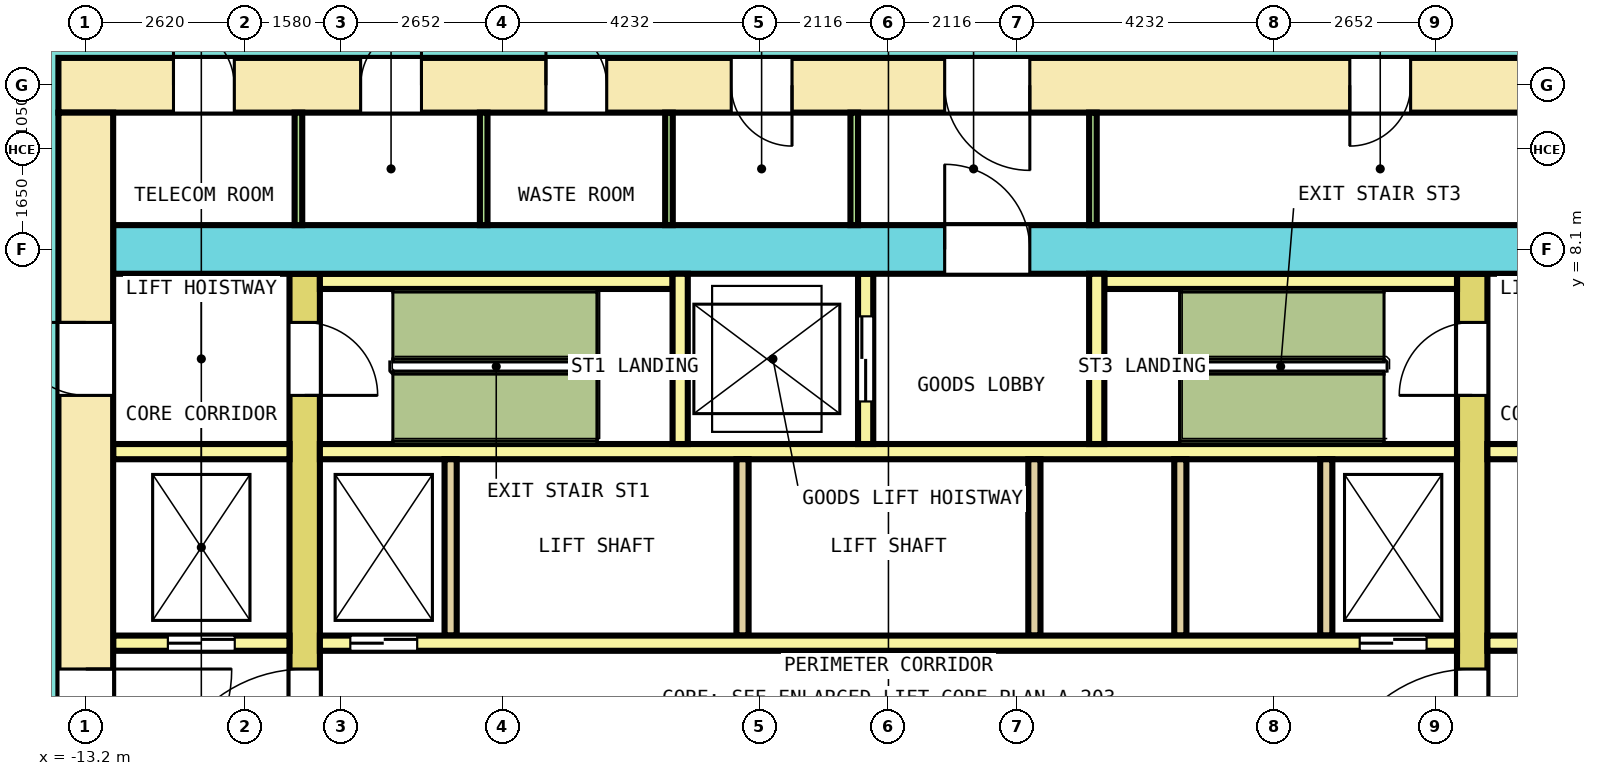
"""IFC4 building model, lengths in metres.
Left out: names, types, materials, properties, quantities, classifications, styles, units other than length and angle.
Written with IfcOpenShell. Run it as: python <this file> out.ifc"""

import sys

from ifc_helpers import new_model, si_unit, direction, frame, frame_2d, origin, place, context, subcontext, project, spatial, rectangle, extrude, element, fill, save


model = new_model("IFC4")
c1 = context("Model", 3, precision=1e-05, world=origin(), true_north=direction((0.0, 1.0)))
c2 = subcontext(c1, "Body", "Model", "MODEL_VIEW")
j1 = project(units=[si_unit("LENGTHUNIT", "METRE"), si_unit("PLANEANGLEUNIT", "RADIAN")], contexts=[c1])
p1 = place(None, origin())
s1 = spatial("IfcSite", under=j1, at=p1, CompositionType="ELEMENT")
p2 = place(p1, origin())
s2 = spatial("IfcBuilding", under=s1, at=p2, CompositionType="ELEMENT")
p3 = place(p2, frame((0.0, 0.0, 5.6)))
s3 = spatial("IfcBuildingStorey", under=s2, at=p3, CompositionType="ELEMENT", Elevation=5.6)
p4 = place(p3, frame((-13.65, 10.8, 0.0), z_axis=(0.0, 0.0, 1.0), x_axis=(1.0, 0.0, 0.0)))
e1 = element("IfcWall", 1, at=p4, inside=s3, PredefinedType="SHEAR", context=c2, shape_type="SweptSolid", body=[
    extrude(rectangle(XDim=27.3, YDim=0.9, at=frame_2d((13.65, 0.0))), origin(), (0.0, 0.0, 1.0), 4.3),
])
p5 = place(p4, frame((1.892, 0.0, 0.0)))
e2 = element("IfcOpeningElement", 2, at=p5, cuts=e1, PredefinedType="OPENING", context=c2, shape_type="SweptSolid", body=[
    extrude(rectangle(XDim=1.0, YDim=2.1, at=frame_2d((0.5, 1.05))), frame((0.0, 0.46, 0.0), z_axis=(0.0, -1.0, 0.0), x_axis=(1.0, 0.0, 0.0)), (0.0, 0.0, 1.0), 0.92),
])
p6 = place(p4, frame((4.97, 0.0, 0.0)))
e3 = element("IfcOpeningElement", 3, at=p6, cuts=e1, PredefinedType="OPENING", context=c2, shape_type="SweptSolid", body=[
    extrude(rectangle(XDim=1.0, YDim=2.1, at=frame_2d((0.5, 1.05))), frame((0.0, 0.46, 0.0), z_axis=(0.0, -1.0, 0.0), x_axis=(1.0, 0.0, 0.0)), (0.0, 0.0, 1.0), 0.92),
])
p7 = place(p4, frame((8.017, 0.0, 0.0)))
e4 = element("IfcOpeningElement", 4, at=p7, cuts=e1, PredefinedType="OPENING", context=c2, shape_type="SweptSolid", body=[
    extrude(rectangle(XDim=1.0, YDim=2.1, at=frame_2d((0.5, 1.05))), frame((0.0, 0.46, 0.0), z_axis=(0.0, -1.0, 0.0), x_axis=(1.0, 0.0, 0.0)), (0.0, 0.0, 1.0), 0.92),
])
p8 = place(p4, frame((11.064, 0.0, 0.0)))
e5 = element("IfcOpeningElement", 5, at=p8, cuts=e1, PredefinedType="OPENING", context=c2, shape_type="SweptSolid", body=[
    extrude(rectangle(XDim=1.0, YDim=2.1, at=frame_2d((0.5, 1.05))), frame((0.0, 0.46, 0.0), z_axis=(0.0, -1.0, 0.0), x_axis=(1.0, 0.0, 0.0)), (0.0, 0.0, 1.0), 0.92),
])
p9 = place(p4, frame((21.238, 0.0, 0.0)))
e6 = element("IfcOpeningElement", 6, at=p9, cuts=e1, PredefinedType="OPENING", context=c2, shape_type="SweptSolid", body=[
    extrude(rectangle(XDim=1.0, YDim=2.1, at=frame_2d((0.5, 1.05))), frame((0.0, 0.46, 0.0), z_axis=(0.0, -1.0, 0.0), x_axis=(1.0, 0.0, 0.0)), (0.0, 0.0, 1.0), 0.92),
])
p10 = place(p4, frame((14.575, 0.0, 0.0)))
e7 = element("IfcOpeningElement", 7, at=p10, cuts=e1, PredefinedType="OPENING", context=c2, shape_type="SweptSolid", body=[
    extrude(rectangle(XDim=1.4, YDim=2.1, at=frame_2d((0.7, 1.05))), frame((0.0, 0.46, 0.0), z_axis=(0.0, -1.0, 0.0), x_axis=(1.0, 0.0, 0.0)), (0.0, 0.0, 1.0), 0.92),
])
p11 = place(p3, frame((-13.2, -10.35, 0.0), z_axis=(0.0, 0.0, 1.0), x_axis=(0.0, 1.0, 0.0)))
e8 = element("IfcWall", 8, at=p11, inside=s3, PredefinedType="SHEAR", context=c2, shape_type="SweptSolid", body=[
    extrude(rectangle(XDim=20.7, YDim=0.9, at=frame_2d((10.35, 0.0))), origin(), (0.0, 0.0, 1.0), 4.3),
])
p12 = place(p11, frame((9.15, 0.0, 0.0)))
e9 = element("IfcOpeningElement", 9, at=p12, cuts=e8, PredefinedType="OPENING", context=c2, shape_type="SweptSolid", body=[
    extrude(rectangle(XDim=2.4, YDim=2.1, at=frame_2d((1.2, 1.05))), frame((0.0, 0.46, 0.0), z_axis=(0.0, -1.0, 0.0), x_axis=(1.0, 0.0, 0.0)), (0.0, 0.0, 1.0), 0.92),
])
p13 = place(p11, frame((16.05, 0.0, 0.0)))
e10 = element("IfcOpeningElement", 10, at=p13, cuts=e8, PredefinedType="OPENING", context=c2, shape_type="SweptSolid", body=[
    extrude(rectangle(XDim=1.2, YDim=2.1, at=frame_2d((0.6, 1.05))), frame((0.0, 0.46, 0.0), z_axis=(0.0, -1.0, 0.0), x_axis=(1.0, 0.0, 0.0)), (0.0, 0.0, 1.0), 0.92),
])
p14 = place(p11, frame((3.45, 0.0, 0.0)))
e11 = element("IfcOpeningElement", 11, at=p14, cuts=e8, PredefinedType="OPENING", context=c2, shape_type="SweptSolid", body=[
    extrude(rectangle(XDim=1.2, YDim=2.1, at=frame_2d((0.6, 1.05))), frame((0.0, 0.46, 0.0), z_axis=(0.0, -1.0, 0.0), x_axis=(1.0, 0.0, 0.0)), (0.0, 0.0, 1.0), 0.92),
])
p15 = place(p3, frame((-12.75, 8.1, 0.0), z_axis=(0.0, 0.0, 1.0), x_axis=(1.0, 0.0, 0.0)))
e12 = element("IfcWall", 12, at=p15, inside=s3, PredefinedType="SHEAR", context=c2, shape_type="SweptSolid", body=[
    extrude(rectangle(XDim=25.5, YDim=0.8, at=frame_2d((12.75, 0.0))), origin(), (0.0, 0.0, 1.0), 4.3),
])
p16 = place(p15, frame((13.675, 0.0, 0.0)))
e13 = element("IfcOpeningElement", 13, at=p16, cuts=e12, PredefinedType="OPENING", context=c2, shape_type="SweptSolid", body=[
    extrude(rectangle(XDim=1.4, YDim=2.1, at=frame_2d((0.7, 1.05))), frame((0.0, 0.41, 0.0), z_axis=(0.0, -1.0, 0.0), x_axis=(1.0, 0.0, 0.0)), (0.0, 0.0, 1.0), 0.82),
])
p17 = place(p3, frame((-9.6, -7.7, 0.0), z_axis=(0.0, 0.0, 1.0), x_axis=(0.0, 1.0, 0.0)))
e14 = element("IfcWall", 14, at=p17, inside=s3, PredefinedType="SHEAR", context=c2, shape_type="SweptSolid", body=[
    extrude(rectangle(XDim=15.4, YDim=0.5, at=frame_2d((7.7, 0.0))), origin(), (0.0, 0.0, 1.0), 4.3),
])
p18 = place(p17, frame((6.5, 0.0, 0.0)))
e15 = element("IfcOpeningElement", 15, at=p18, cuts=e14, PredefinedType="OPENING", context=c2, shape_type="SweptSolid", body=[
    extrude(rectangle(XDim=2.4, YDim=2.1, at=frame_2d((1.2, 1.05))), frame((0.0, 0.26, 0.0), z_axis=(0.0, -1.0, 0.0), x_axis=(1.0, 0.0, 0.0)), (0.0, 0.0, 1.0), 0.52),
])
p19 = place(p17, frame((13.4, 0.0, 0.0)))
e16 = element("IfcOpeningElement", 16, at=p19, cuts=e14, PredefinedType="OPENING", context=c2, shape_type="SweptSolid", body=[
    extrude(rectangle(XDim=1.2, YDim=2.1, at=frame_2d((0.6, 1.05))), frame((0.0, 0.26, 0.0), z_axis=(0.0, -1.0, 0.0), x_axis=(1.0, 0.0, 0.0)), (0.0, 0.0, 1.0), 0.52),
])
p20 = place(p17, frame((0.8, 0.0, 0.0)))
e17 = element("IfcOpeningElement", 17, at=p20, cuts=e14, PredefinedType="OPENING", context=c2, shape_type="SweptSolid", body=[
    extrude(rectangle(XDim=1.2, YDim=2.1, at=frame_2d((0.6, 1.05))), frame((0.0, 0.26, 0.0), z_axis=(0.0, -1.0, 0.0), x_axis=(1.0, 0.0, 0.0)), (0.0, 0.0, 1.0), 0.52),
])
p21 = place(p3, frame((9.6, -7.7, 0.0), z_axis=(0.0, 0.0, 1.0), x_axis=(0.0, 1.0, 0.0)))
e18 = element("IfcWall", 18, at=p21, inside=s3, PredefinedType="SHEAR", context=c2, shape_type="SweptSolid", body=[
    extrude(rectangle(XDim=15.4, YDim=0.5, at=frame_2d((7.7, 0.0))), origin(), (0.0, 0.0, 1.0), 4.3),
])
p22 = place(p21, frame((6.5, 0.0, 0.0)))
e19 = element("IfcOpeningElement", 19, at=p22, cuts=e18, PredefinedType="OPENING", context=c2, shape_type="SweptSolid", body=[
    extrude(rectangle(XDim=2.4, YDim=2.1, at=frame_2d((1.2, 1.05))), frame((0.0, 0.26, 0.0), z_axis=(0.0, -1.0, 0.0), x_axis=(1.0, 0.0, 0.0)), (0.0, 0.0, 1.0), 0.52),
])
p23 = place(p21, frame((13.4, 0.0, 0.0)))
e20 = element("IfcOpeningElement", 20, at=p23, cuts=e18, PredefinedType="OPENING", context=c2, shape_type="SweptSolid", body=[
    extrude(rectangle(XDim=1.2, YDim=2.1, at=frame_2d((0.6, 1.05))), frame((0.0, 0.26, 0.0), z_axis=(0.0, -1.0, 0.0), x_axis=(1.0, 0.0, 0.0)), (0.0, 0.0, 1.0), 0.52),
])
p24 = place(p21, frame((0.9, 0.0, 0.0)))
e21 = element("IfcOpeningElement", 21, at=p24, cuts=e18, PredefinedType="OPENING", context=c2, shape_type="SweptSolid", body=[
    extrude(rectangle(XDim=1.0, YDim=2.1, at=frame_2d((0.5, 1.05))), frame((0.0, 0.26, 0.0), z_axis=(0.0, -1.0, 0.0), x_axis=(1.0, 0.0, 0.0)), (0.0, 0.0, 1.0), 0.52),
])
p25 = place(p3, frame((-12.75, 1.625, 0.0), z_axis=(0.0, 0.0, 1.0), x_axis=(1.0, 0.0, 0.0)))
e22 = element("IfcWall", 22, at=p25, inside=s3, PredefinedType="SOLIDWALL", context=c2, shape_type="SweptSolid", body=[
    extrude(rectangle(XDim=2.9, YDim=0.25, at=frame_2d((1.45, 0.0))), origin(), (0.0, 0.0, 1.0), 4.3),
])
p26 = place(p25, frame((0.9, 0.0, 0.0)))
e23 = element("IfcOpeningElement", 23, at=p26, cuts=e22, PredefinedType="OPENING", context=c2, shape_type="SweptSolid", body=[
    extrude(rectangle(XDim=1.1, YDim=2.1, at=frame_2d((0.55, 1.05))), frame((0.0, 0.135, 0.0), z_axis=(0.0, -1.0, 0.0), x_axis=(1.0, 0.0, 0.0)), (0.0, 0.0, 1.0), 0.27),
])
p27 = place(p3, frame((-9.35, 1.625, 0.0), z_axis=(0.0, 0.0, 1.0), x_axis=(1.0, 0.0, 0.0)))
e24 = element("IfcWall", 24, at=p27, inside=s3, PredefinedType="SOLIDWALL", context=c2, shape_type="SweptSolid", body=[
    extrude(rectangle(XDim=18.7, YDim=0.25, at=frame_2d((9.35, 0.0))), origin(), (0.0, 0.0, 1.0), 4.3),
])
p28 = place(p27, frame((0.5, 0.0, 0.0)))
e25 = element("IfcOpeningElement", 25, at=p28, cuts=e24, PredefinedType="OPENING", context=c2, shape_type="SweptSolid", body=[
    extrude(rectangle(XDim=1.1, YDim=2.1, at=frame_2d((0.55, 1.05))), frame((0.0, 0.135, 0.0), z_axis=(0.0, -1.0, 0.0), x_axis=(1.0, 0.0, 0.0)), (0.0, 0.0, 1.0), 0.27),
])
p29 = place(p27, frame((17.1, 0.0, 0.0)))
e26 = element("IfcOpeningElement", 26, at=p29, cuts=e24, PredefinedType="OPENING", context=c2, shape_type="SweptSolid", body=[
    extrude(rectangle(XDim=1.1, YDim=2.1, at=frame_2d((0.55, 1.05))), frame((0.0, 0.135, 0.0), z_axis=(0.0, -1.0, 0.0), x_axis=(1.0, 0.0, 0.0)), (0.0, 0.0, 1.0), 0.27),
])
p30 = place(p3, frame((9.85, 1.625, 0.0), z_axis=(0.0, 0.0, 1.0), x_axis=(1.0, 0.0, 0.0)))
e27 = element("IfcWall", 27, at=p30, inside=s3, PredefinedType="SOLIDWALL", context=c2, shape_type="SweptSolid", body=[
    extrude(rectangle(XDim=2.9, YDim=0.25, at=frame_2d((1.45, 0.0))), origin(), (0.0, 0.0, 1.0), 4.3),
])
p31 = place(p30, frame((0.9, 0.0, 0.0)))
e28 = element("IfcOpeningElement", 28, at=p31, cuts=e27, PredefinedType="OPENING", context=c2, shape_type="SweptSolid", body=[
    extrude(rectangle(XDim=1.1, YDim=2.1, at=frame_2d((0.55, 1.05))), frame((0.0, 0.135, 0.0), z_axis=(0.0, -1.0, 0.0), x_axis=(1.0, 0.0, 0.0)), (0.0, 0.0, 1.0), 0.27),
])
p32 = place(p3, frame((-12.75, 4.775, 0.0), z_axis=(0.0, 0.0, 1.0), x_axis=(1.0, 0.0, 0.0)))
e29 = element("IfcWall", 29, at=p32, inside=s3, PredefinedType="SOLIDWALL", context=c2, shape_type="SweptSolid", body=[
    extrude(rectangle(XDim=2.9, YDim=0.25, at=frame_2d((1.45, 0.0))), origin(), (0.0, 0.0, 1.0), 4.3),
])
p33 = place(p3, frame((-9.35, 4.775, 0.0), z_axis=(0.0, 0.0, 1.0), x_axis=(1.0, 0.0, 0.0)))
e30 = element("IfcWall", 30, at=p33, inside=s3, PredefinedType="SOLIDWALL", context=c2, shape_type="SweptSolid", body=[
    extrude(rectangle(XDim=18.7, YDim=0.25, at=frame_2d((9.35, 0.0))), origin(), (0.0, 0.0, 1.0), 4.3),
])
p34 = place(p3, frame((9.85, 4.775, 0.0), z_axis=(0.0, 0.0, 1.0), x_axis=(1.0, 0.0, 0.0)))
e31 = element("IfcWall", 31, at=p34, inside=s3, PredefinedType="SOLIDWALL", context=c2, shape_type="SweptSolid", body=[
    extrude(rectangle(XDim=2.9, YDim=0.25, at=frame_2d((1.45, 0.0))), origin(), (0.0, 0.0, 1.0), 4.3),
])
for number, where, z_axis, x_axis in (
    (32, (-7.2, 1.75, 0.0), (0.0, 0.0, 1.0), (0.0, 1.0, 0.0)),
    (33, (-2.4, 1.75, 0.0), (0.0, 0.0, 1.0), (0.0, 1.0, 0.0)),
    (34, (2.4, 1.75, 0.0), (0.0, 0.0, 1.0), (0.0, 1.0, 0.0)),
    (35, (4.8, 1.75, 0.0), (0.0, 0.0, 1.0), (0.0, 1.0, 0.0)),
    (36, (7.2, 1.75, 0.0), (0.0, 0.0, 1.0), (0.0, 1.0, 0.0)),
):
    element("IfcWall", number, at=place(p3, frame(where, z_axis=z_axis, x_axis=x_axis)), inside=s3, PredefinedType="SOLIDWALL", context=c2, shape_type="SweptSolid", body=[
        extrude(rectangle(XDim=2.9, YDim=0.2, at=frame_2d((1.45, 0.0))), origin(), (0.0, 0.0, 1.0), 4.3),
    ])
for number, where, z_axis, x_axis in (
    (37, (-9.35, 7.575, 0.0), (0.0, 0.0, 1.0), (1.0, 0.0, 0.0)),
    (38, (3.55, 7.575, 0.0), (0.0, 0.0, 1.0), (1.0, 0.0, 0.0)),
):
    element("IfcWall", number, at=place(p3, frame(where, z_axis=z_axis, x_axis=x_axis)), inside=s3, PredefinedType="SOLIDWALL", context=c2, shape_type="SweptSolid", body=[
        extrude(rectangle(XDim=5.8, YDim=0.25, at=frame_2d((2.9, 0.0))), origin(), (0.0, 0.0, 1.0), 4.3),
    ])
p35 = place(p3, frame((-3.425, 4.9, 0.0), z_axis=(0.0, 0.0, 1.0), x_axis=(0.0, 1.0, 0.0)))
e39 = element("IfcWall", 39, at=p35, inside=s3, PredefinedType="SOLIDWALL", context=c2, shape_type="SweptSolid", body=[
    extrude(rectangle(XDim=2.8, YDim=0.25, at=frame_2d((1.4, 0.0))), origin(), (0.0, 0.0, 1.0), 4.3),
])
p36 = place(p3, frame((-0.375, 4.9, 0.0), z_axis=(0.0, 0.0, 1.0), x_axis=(0.0, 1.0, 0.0)))
e40 = element("IfcWall", 40, at=p36, inside=s3, PredefinedType="SOLIDWALL", context=c2, shape_type="SweptSolid", body=[
    extrude(rectangle(XDim=2.8, YDim=0.25, at=frame_2d((1.4, 0.0))), origin(), (0.0, 0.0, 1.0), 4.3),
])
p37 = place(p36, frame((0.7, 0.0, 0.0)))
e41 = element("IfcOpeningElement", 41, at=p37, cuts=e40, PredefinedType="OPENING", context=c2, shape_type="SweptSolid", body=[
    extrude(rectangle(XDim=1.4, YDim=2.1, at=frame_2d((0.7, 1.05))), frame((0.0, 0.135, 0.0), z_axis=(0.0, -1.0, 0.0), x_axis=(1.0, 0.0, 0.0)), (0.0, 0.0, 1.0), 0.27),
])
p38 = place(p3, frame((3.425, 4.9, 0.0), z_axis=(0.0, 0.0, 1.0), x_axis=(0.0, 1.0, 0.0)))
e42 = element("IfcWall", 42, at=p38, inside=s3, PredefinedType="SOLIDWALL", context=c2, shape_type="SweptSolid", body=[
    extrude(rectangle(XDim=2.8, YDim=0.25, at=frame_2d((1.4, 0.0))), origin(), (0.0, 0.0, 1.0), 4.3),
])
for number, where, z_axis, x_axis in (
    (43, (-9.703, 8.5, 0.0), (0.0, 0.0, 1.0), (0.0, 1.0, 0.0)),
    (44, (-6.656, 8.5, 0.0), (0.0, 0.0, 1.0), (0.0, 1.0, 0.0)),
    (45, (-3.609, 8.5, 0.0), (0.0, 0.0, 1.0), (0.0, 1.0, 0.0)),
    (46, (-0.562, 8.5, 0.0), (0.0, 0.0, 1.0), (0.0, 1.0, 0.0)),
    (47, (3.363, 8.5, 0.0), (0.0, 0.0, 1.0), (0.0, 1.0, 0.0)),
):
    element("IfcWall", number, at=place(p3, frame(where, z_axis=z_axis, x_axis=x_axis)), inside=s3, PredefinedType="PARTITIONING", context=c2, shape_type="SweptSolid", body=[
        extrude(rectangle(XDim=1.85, YDim=0.125, at=frame_2d((0.925, 0.0))), origin(), (0.0, 0.0, 1.0), 4.3),
    ])
p39 = place(p26, origin())
e48 = element("IfcDoor", 48, at=p39, inside=s3, OperationType="DOUBLE_DOOR_SLIDING", PredefinedType="DOOR", context=c2, shape_type="SweptSolid", body=[
    extrude(rectangle(XDim=1.1, YDim=2.1, at=frame_2d((0.55, 1.05))), frame((0.0, 0.075, 0.0), z_axis=(0.0, -1.0, 0.0), x_axis=(1.0, 0.0, 0.0)), (0.0, 0.0, 1.0), 0.15),
])
fill(e23, e48)
p40 = place(p28, origin())
e49 = element("IfcDoor", 49, at=p40, inside=s3, OperationType="DOUBLE_DOOR_SLIDING", PredefinedType="DOOR", context=c2, shape_type="SweptSolid", body=[
    extrude(rectangle(XDim=1.1, YDim=2.1, at=frame_2d((0.55, 1.05))), frame((0.0, 0.075, 0.0), z_axis=(0.0, -1.0, 0.0), x_axis=(1.0, 0.0, 0.0)), (0.0, 0.0, 1.0), 0.15),
])
fill(e25, e49)
p41 = place(p29, origin())
e50 = element("IfcDoor", 50, at=p41, inside=s3, OperationType="DOUBLE_DOOR_SLIDING", PredefinedType="DOOR", context=c2, shape_type="SweptSolid", body=[
    extrude(rectangle(XDim=1.1, YDim=2.1, at=frame_2d((0.55, 1.05))), frame((0.0, 0.075, 0.0), z_axis=(0.0, -1.0, 0.0), x_axis=(1.0, 0.0, 0.0)), (0.0, 0.0, 1.0), 0.15),
])
fill(e26, e50)
p42 = place(p37, origin())
e51 = element("IfcDoor", 51, at=p42, inside=s3, OperationType="DOUBLE_DOOR_SLIDING", PredefinedType="DOOR", context=c2, shape_type="SweptSolid", body=[
    extrude(rectangle(XDim=1.4, YDim=2.1, at=frame_2d((0.7, 1.05))), frame((0.0, 0.075, 0.0), z_axis=(0.0, -1.0, 0.0), x_axis=(1.0, 0.0, 0.0)), (0.0, 0.0, 1.0), 0.15),
])
fill(e41, e51)
p43 = place(p18, origin())
e52 = element("IfcDoor", 52, at=p43, inside=s3, OperationType="DOUBLE_DOOR_SINGLE_SWING", PredefinedType="DOOR", context=c2, shape_type="SweptSolid", body=[
    extrude(rectangle(XDim=2.4, YDim=2.1, at=frame_2d((1.2, 1.05))), frame((0.0, 0.2, 0.0), z_axis=(0.0, -1.0, 0.0), x_axis=(1.0, 0.0, 0.0)), (0.0, 0.0, 1.0), 0.4),
])
fill(e15, e52)
p44 = place(p22, origin())
e53 = element("IfcDoor", 53, at=p44, inside=s3, OperationType="DOUBLE_DOOR_SINGLE_SWING", PredefinedType="DOOR", context=c2, shape_type="SweptSolid", body=[
    extrude(rectangle(XDim=2.4, YDim=2.1, at=frame_2d((1.2, 1.05))), frame((0.0, 0.2, 0.0), z_axis=(0.0, -1.0, 0.0), x_axis=(1.0, 0.0, 0.0)), (0.0, 0.0, 1.0), 0.4),
])
fill(e19, e53)
p45 = place(p12, origin())
e54 = element("IfcDoor", 54, at=p45, inside=s3, OperationType="DOUBLE_DOOR_SINGLE_SWING", PredefinedType="DOOR", context=c2, shape_type="SweptSolid", body=[
    extrude(rectangle(XDim=2.4, YDim=2.1, at=frame_2d((1.2, 1.05))), frame((0.0, 0.3, 0.0), z_axis=(0.0, -1.0, 0.0), x_axis=(1.0, 0.0, 0.0)), (0.0, 0.0, 1.0), 0.6),
])
fill(e9, e54)
p46 = place(p19, origin())
e55 = element("IfcDoor", 55, at=p46, inside=s3, OperationType="SINGLE_SWING_LEFT", PredefinedType="DOOR", context=c2, shape_type="SweptSolid", body=[
    extrude(rectangle(XDim=1.2, YDim=2.1, at=frame_2d((0.6, 1.05))), frame((0.0, 0.2, 0.0), z_axis=(0.0, -1.0, 0.0), x_axis=(1.0, 0.0, 0.0)), (0.0, 0.0, 1.0), 0.4),
])
fill(e16, e55)
p47 = place(p13, origin())
e56 = element("IfcDoor", 56, at=p47, inside=s3, OperationType="SINGLE_SWING_RIGHT", PredefinedType="DOOR", context=c2, shape_type="SweptSolid", body=[
    extrude(rectangle(XDim=1.2, YDim=2.1, at=frame_2d((0.6, 1.05))), frame((0.0, 0.3, 0.0), z_axis=(0.0, -1.0, 0.0), x_axis=(1.0, 0.0, 0.0)), (0.0, 0.0, 1.0), 0.6),
])
fill(e10, e56)
p48 = place(p23, origin())
e57 = element("IfcDoor", 57, at=p48, inside=s3, OperationType="SINGLE_SWING_LEFT", PredefinedType="DOOR", context=c2, shape_type="SweptSolid", body=[
    extrude(rectangle(XDim=1.2, YDim=2.1, at=frame_2d((0.6, 1.05))), frame((0.0, 0.2, 0.0), z_axis=(0.0, -1.0, 0.0), x_axis=(1.0, 0.0, 0.0)), (0.0, 0.0, 1.0), 0.4),
])
fill(e20, e57)
p49 = place(p16, origin())
e58 = element("IfcDoor", 58, at=p49, inside=s3, OperationType="DOUBLE_DOOR_SINGLE_SWING", PredefinedType="DOOR", context=c2, shape_type="SweptSolid", body=[
    extrude(rectangle(XDim=1.4, YDim=2.1, at=frame_2d((0.7, 1.05))), frame((0.0, 0.3, 0.0), z_axis=(0.0, -1.0, 0.0), x_axis=(1.0, 0.0, 0.0)), (0.0, 0.0, 1.0), 0.6),
])
fill(e13, e58)
p50 = place(p5, origin())
e59 = element("IfcDoor", 59, at=p50, inside=s3, OperationType="SINGLE_SWING_RIGHT", PredefinedType="DOOR", context=c2, shape_type="SweptSolid", body=[
    extrude(rectangle(XDim=1.0, YDim=2.1, at=frame_2d((0.5, 1.05))), frame((0.0, 0.3, 0.0), z_axis=(0.0, -1.0, 0.0), x_axis=(1.0, 0.0, 0.0)), (0.0, 0.0, 1.0), 0.6),
])
fill(e2, e59)
p51 = place(p6, origin())
e60 = element("IfcDoor", 60, at=p51, inside=s3, OperationType="SINGLE_SWING_LEFT", PredefinedType="DOOR", context=c2, shape_type="SweptSolid", body=[
    extrude(rectangle(XDim=1.0, YDim=2.1, at=frame_2d((0.5, 1.05))), frame((0.0, 0.3, 0.0), z_axis=(0.0, -1.0, 0.0), x_axis=(1.0, 0.0, 0.0)), (0.0, 0.0, 1.0), 0.6),
])
fill(e3, e60)
p52 = place(p7, origin())
e61 = element("IfcDoor", 61, at=p52, inside=s3, OperationType="SINGLE_SWING_RIGHT", PredefinedType="DOOR", context=c2, shape_type="SweptSolid", body=[
    extrude(rectangle(XDim=1.0, YDim=2.1, at=frame_2d((0.5, 1.05))), frame((0.0, 0.3, 0.0), z_axis=(0.0, -1.0, 0.0), x_axis=(1.0, 0.0, 0.0)), (0.0, 0.0, 1.0), 0.6),
])
fill(e4, e61)
p53 = place(p8, origin())
e62 = element("IfcDoor", 62, at=p53, inside=s3, OperationType="SINGLE_SWING_LEFT", PredefinedType="DOOR", context=c2, shape_type="SweptSolid", body=[
    extrude(rectangle(XDim=1.0, YDim=2.1, at=frame_2d((0.5, 1.05))), frame((0.0, 0.3, 0.0), z_axis=(0.0, -1.0, 0.0), x_axis=(1.0, 0.0, 0.0)), (0.0, 0.0, 1.0), 0.6),
])
fill(e5, e62)
p54 = place(p9, origin())
e63 = element("IfcDoor", 63, at=p54, inside=s3, OperationType="SINGLE_SWING_RIGHT", PredefinedType="DOOR", context=c2, shape_type="SweptSolid", body=[
    extrude(rectangle(XDim=1.0, YDim=2.1, at=frame_2d((0.5, 1.05))), frame((0.0, 0.3, 0.0), z_axis=(0.0, -1.0, 0.0), x_axis=(1.0, 0.0, 0.0)), (0.0, 0.0, 1.0), 0.6),
])
fill(e6, e63)
p55 = place(p10, origin())
e64 = element("IfcDoor", 64, at=p55, inside=s3, OperationType="DOUBLE_DOOR_SINGLE_SWING", PredefinedType="DOOR", context=c2, shape_type="SweptSolid", body=[
    extrude(rectangle(XDim=1.4, YDim=2.1, at=frame_2d((0.7, 1.05))), frame((0.0, 0.3, 0.0), z_axis=(0.0, -1.0, 0.0), x_axis=(1.0, 0.0, 0.0)), (0.0, 0.0, 1.0), 0.6),
])
fill(e7, e64)
save(model, sys.argv[1])
